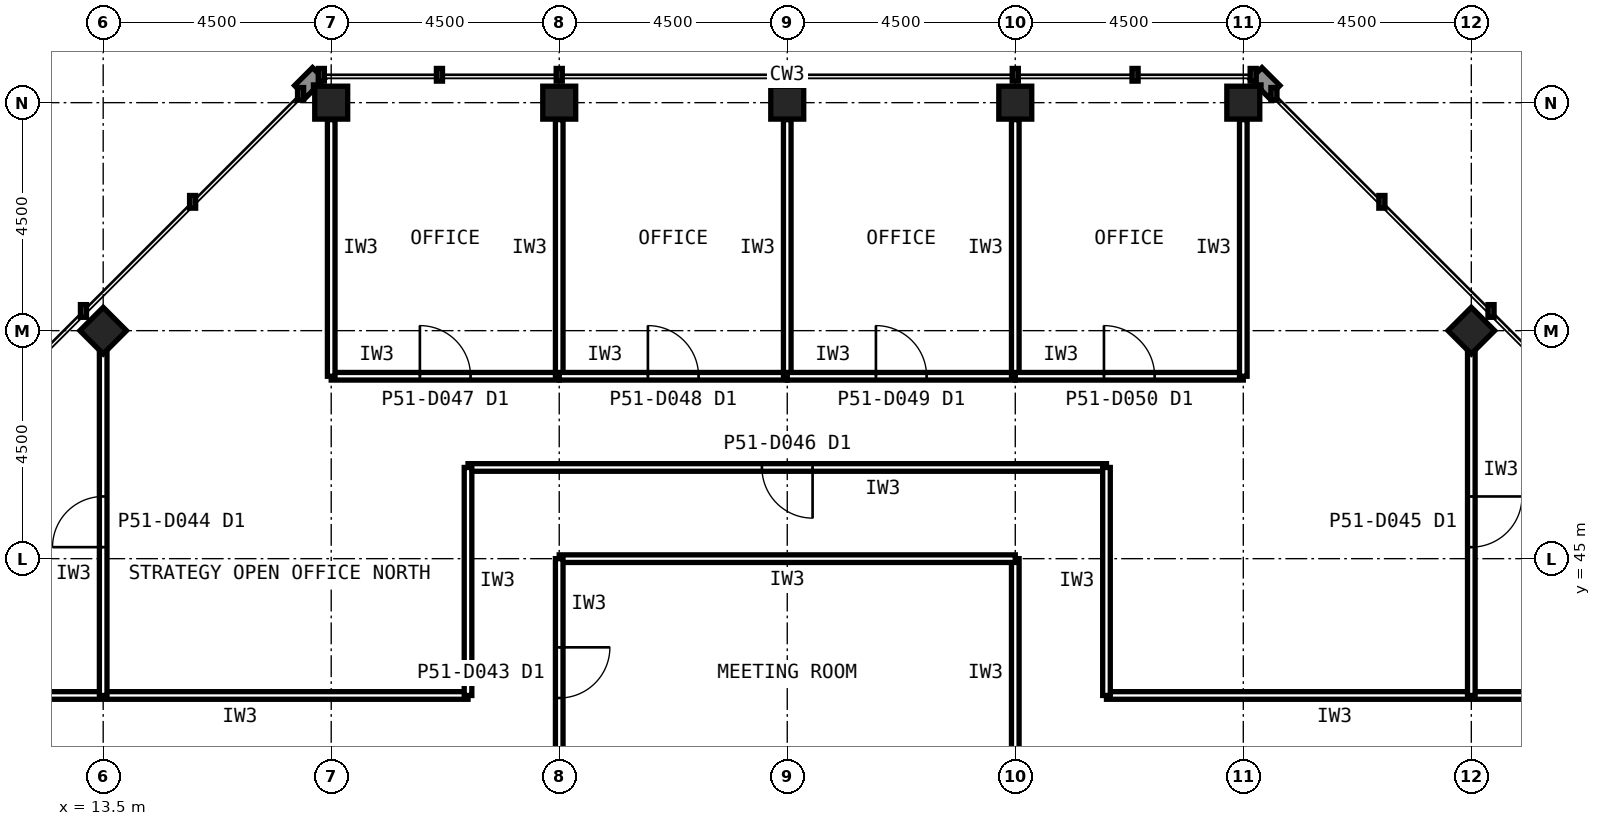
"""IFC4 building model, lengths in metres.
Left out: names, types, materials, properties, quantities, classifications, styles, units other than length and angle.
Written with IfcOpenShell. Run it as: python <this file> out.ifc"""

import sys

from ifc_helpers import new_model, si_unit, direction, frame, frame_2d, origin, origin_2d, place, context, subcontext, project, spatial, rectangle, hollow_rectangle, extrude, element, fill, save


model = new_model("IFC4")
c1 = context("Model", 3, precision=1e-05, world=origin(), true_north=direction((0.0, 1.0)))
c2 = subcontext(c1, "Body", "Model", "MODEL_VIEW")
j1 = project(units=[si_unit("LENGTHUNIT", "METRE"), si_unit("PLANEANGLEUNIT", "RADIAN")], contexts=[c1])
p1 = place(None, origin())
s1 = spatial("IfcSite", under=j1, at=p1, CompositionType="ELEMENT")
p2 = place(p1, origin())
s2 = spatial("IfcBuilding", under=s1, at=p2, CompositionType="ELEMENT")
p3 = place(p2, frame((0.0, 0.0, 214.6)))
s3 = spatial("IfcBuildingStorey", under=s2, at=p3, CompositionType="ELEMENT", Elevation=214.6)
for number, where, z_axis, x_axis in (
    (1, (36.0, 54.0, 0.0), (0.0, 0.0, 1.0), (1.0, 0.0, 0.0)),
    (2, (31.5, 54.0, 0.0), (0.0, 0.0, 1.0), (1.0, 0.0, 0.0)),
    (3, (27.0, 54.0, 0.0), (0.0, 0.0, 1.0), (1.0, 0.0, 0.0)),
    (4, (22.5, 54.0, 0.0), (0.0, 0.0, 1.0), (1.0, 0.0, 0.0)),
    (5, (18.0, 54.0, 0.0), (0.0, 0.0, 1.0), (1.0, 0.0, 0.0)),
    (6, (40.5, 49.5, 0.0), (0.0, 0.0, 1.0), (0.707, 0.707, 0.0)),
    (7, (13.5, 49.5, 0.0), (0.0, 0.0, 1.0), (0.707, 0.707, 0.0)),
):
    element("IfcColumn", number, at=place(p3, frame(where, z_axis=z_axis, x_axis=x_axis)), inside=s3, PredefinedType="COLUMN", context=c2, shape_type="SweptSolid", body=[
        extrude(hollow_rectangle(XDim=0.65, YDim=0.65, WallThickness=0.032, at=origin_2d()), origin(), (0.0, 0.0, 1.0), 4.0),
    ])
p4 = place(p3, frame((33.3, 46.8, 0.0), z_axis=(0.0, 0.0, 1.0), x_axis=(-1.0, 0.0, 0.0)))
e8 = element("IfcWall", 8, at=p4, inside=s3, PredefinedType="PARTITIONING", context=c2, shape_type="SweptSolid", body=[
    extrude(rectangle(XDim=12.6, YDim=0.15, at=frame_2d((6.3, 0.0))), origin(), (0.0, 0.0, 1.0), 3.84),
])
p5 = place(p4, frame((5.8, 0.0, 0.0)))
e9 = element("IfcOpeningElement", 9, at=p5, cuts=e8, PredefinedType="OPENING", context=c2, shape_type="SweptSolid", body=[
    extrude(rectangle(XDim=1.0, YDim=2.1, at=frame_2d((0.5, 1.05))), frame((0.0, 0.085, 0.0), z_axis=(0.0, -1.0, 0.0), x_axis=(1.0, 0.0, 0.0)), (0.0, 0.0, 1.0), 0.17),
])
for number, where, z_axis, x_axis in (
    (10, (20.7, 42.3, 0.0), (0.0, 0.0, 1.0), (-1.0, 0.0, 0.0)),
    (11, (42.3, 42.3, 0.0), (0.0, 0.0, 1.0), (-1.0, 0.0, 0.0)),
):
    element("IfcWall", number, at=place(p3, frame(where, z_axis=z_axis, x_axis=x_axis)), inside=s3, PredefinedType="PARTITIONING", context=c2, shape_type="SweptSolid", body=[
        extrude(rectangle(XDim=9.0, YDim=0.15, at=frame_2d((4.5, 0.0))), origin(), (0.0, 0.0, 1.0), 3.84),
    ])
for number, where, z_axis, x_axis in (
    (12, (20.7, 46.8, 0.0), (0.0, 0.0, 1.0), (0.0, -1.0, 0.0)),
    (13, (33.3, 42.3, 0.0), (0.0, 0.0, 1.0), (0.0, 1.0, 0.0)),
):
    element("IfcWall", number, at=place(p3, frame(where, z_axis=z_axis, x_axis=x_axis)), inside=s3, PredefinedType="PARTITIONING", context=c2, shape_type="SweptSolid", body=[
        extrude(rectangle(XDim=4.5, YDim=0.15, at=frame_2d((2.25, 0.0))), origin(), (0.0, 0.0, 1.0), 3.84),
    ])
p6 = place(p3, frame((18.0, 48.6, 0.0), z_axis=(0.0, 0.0, 1.0), x_axis=(1.0, 0.0, 0.0)))
e14 = element("IfcWall", 14, at=p6, inside=s3, PredefinedType="PARTITIONING", context=c2, shape_type="SweptSolid", body=[
    extrude(rectangle(XDim=4.5, YDim=0.15, at=frame_2d((2.25, 0.0))), origin(), (0.0, 0.0, 1.0), 3.84),
])
p7 = place(p6, frame((1.75, 0.0, 0.0)))
e15 = element("IfcOpeningElement", 15, at=p7, cuts=e14, PredefinedType="OPENING", context=c2, shape_type="SweptSolid", body=[
    extrude(rectangle(XDim=1.0, YDim=2.1, at=frame_2d((0.5, 1.05))), frame((0.0, 0.085, 0.0), z_axis=(0.0, -1.0, 0.0), x_axis=(1.0, 0.0, 0.0)), (0.0, 0.0, 1.0), 0.17),
])
for number, where, z_axis, x_axis in (
    (16, (22.5, 48.6, 0.0), (0.0, 0.0, 1.0), (0.0, 1.0, 0.0)),
    (17, (18.0, 53.665, 0.0), (0.0, 0.0, 1.0), (0.0, -1.0, 0.0)),
):
    element("IfcWall", number, at=place(p3, frame(where, z_axis=z_axis, x_axis=x_axis)), inside=s3, PredefinedType="PARTITIONING", context=c2, shape_type="SweptSolid", body=[
        extrude(rectangle(XDim=5.065, YDim=0.15, at=frame_2d((2.532, 0.0))), origin(), (0.0, 0.0, 1.0), 2.989),
    ])
p8 = place(p3, frame((22.5, 48.6, 0.0), z_axis=(0.0, 0.0, 1.0), x_axis=(1.0, 0.0, 0.0)))
e18 = element("IfcWall", 18, at=p8, inside=s3, PredefinedType="PARTITIONING", context=c2, shape_type="SweptSolid", body=[
    extrude(rectangle(XDim=4.5, YDim=0.15, at=frame_2d((2.25, 0.0))), origin(), (0.0, 0.0, 1.0), 3.84),
])
p9 = place(p8, frame((1.75, 0.0, 0.0)))
e19 = element("IfcOpeningElement", 19, at=p9, cuts=e18, PredefinedType="OPENING", context=c2, shape_type="SweptSolid", body=[
    extrude(rectangle(XDim=1.0, YDim=2.1, at=frame_2d((0.5, 1.05))), frame((0.0, 0.085, 0.0), z_axis=(0.0, -1.0, 0.0), x_axis=(1.0, 0.0, 0.0)), (0.0, 0.0, 1.0), 0.17),
])
p10 = place(p3, frame((27.0, 48.6, 0.0), z_axis=(0.0, 0.0, 1.0), x_axis=(0.0, 1.0, 0.0)))
e20 = element("IfcWall", 20, at=p10, inside=s3, PredefinedType="PARTITIONING", context=c2, shape_type="SweptSolid", body=[
    extrude(rectangle(XDim=5.065, YDim=0.15, at=frame_2d((2.532, 0.0))), origin(), (0.0, 0.0, 1.0), 2.989),
])
p11 = place(p3, frame((27.0, 48.6, 0.0), z_axis=(0.0, 0.0, 1.0), x_axis=(1.0, 0.0, 0.0)))
e21 = element("IfcWall", 21, at=p11, inside=s3, PredefinedType="PARTITIONING", context=c2, shape_type="SweptSolid", body=[
    extrude(rectangle(XDim=4.5, YDim=0.15, at=frame_2d((2.25, 0.0))), origin(), (0.0, 0.0, 1.0), 3.84),
])
p12 = place(p11, frame((1.75, 0.0, 0.0)))
e22 = element("IfcOpeningElement", 22, at=p12, cuts=e21, PredefinedType="OPENING", context=c2, shape_type="SweptSolid", body=[
    extrude(rectangle(XDim=1.0, YDim=2.1, at=frame_2d((0.5, 1.05))), frame((0.0, 0.085, 0.0), z_axis=(0.0, -1.0, 0.0), x_axis=(1.0, 0.0, 0.0)), (0.0, 0.0, 1.0), 0.17),
])
p13 = place(p3, frame((31.5, 48.6, 0.0), z_axis=(0.0, 0.0, 1.0), x_axis=(0.0, 1.0, 0.0)))
e23 = element("IfcWall", 23, at=p13, inside=s3, PredefinedType="PARTITIONING", context=c2, shape_type="SweptSolid", body=[
    extrude(rectangle(XDim=5.065, YDim=0.15, at=frame_2d((2.532, 0.0))), origin(), (0.0, 0.0, 1.0), 2.989),
])
p14 = place(p3, frame((31.5, 48.6, 0.0), z_axis=(0.0, 0.0, 1.0), x_axis=(1.0, 0.0, 0.0)))
e24 = element("IfcWall", 24, at=p14, inside=s3, PredefinedType="PARTITIONING", context=c2, shape_type="SweptSolid", body=[
    extrude(rectangle(XDim=4.5, YDim=0.15, at=frame_2d((2.25, 0.0))), origin(), (0.0, 0.0, 1.0), 3.84),
])
p15 = place(p14, frame((1.75, 0.0, 0.0)))
e25 = element("IfcOpeningElement", 25, at=p15, cuts=e24, PredefinedType="OPENING", context=c2, shape_type="SweptSolid", body=[
    extrude(rectangle(XDim=1.0, YDim=2.1, at=frame_2d((0.5, 1.05))), frame((0.0, 0.085, 0.0), z_axis=(0.0, -1.0, 0.0), x_axis=(1.0, 0.0, 0.0)), (0.0, 0.0, 1.0), 0.17),
])
p16 = place(p3, frame((36.0, 48.6, 0.0), z_axis=(0.0, 0.0, 1.0), x_axis=(0.0, 1.0, 0.0)))
e26 = element("IfcWall", 26, at=p16, inside=s3, PredefinedType="PARTITIONING", context=c2, shape_type="SweptSolid", body=[
    extrude(rectangle(XDim=5.065, YDim=0.15, at=frame_2d((2.532, 0.0))), origin(), (0.0, 0.0, 1.0), 2.989),
])
p17 = place(p3, frame((31.5, 40.5, 0.0), z_axis=(0.0, 0.0, 1.0), x_axis=(0.0, 1.0, 0.0)))
e27 = element("IfcWall", 27, at=p17, inside=s3, PredefinedType="PARTITIONING", context=c2, shape_type="SweptSolid", body=[
    extrude(rectangle(XDim=4.5, YDim=0.15, at=frame_2d((2.25, 0.0))), origin(), (0.0, 0.0, 1.0), 2.989),
])
p18 = place(p3, frame((31.5, 45.0, 0.0), z_axis=(0.0, 0.0, 1.0), x_axis=(-1.0, 0.0, 0.0)))
e28 = element("IfcWall", 28, at=p18, inside=s3, PredefinedType="PARTITIONING", context=c2, shape_type="SweptSolid", body=[
    extrude(rectangle(XDim=9.0, YDim=0.15, at=frame_2d((4.5, 0.0))), origin(), (0.0, 0.0, 1.0), 3.84),
])
p19 = place(p3, frame((22.5, 45.0, 0.0), z_axis=(0.0, 0.0, 1.0), x_axis=(0.0, -1.0, 0.0)))
e29 = element("IfcWall", 29, at=p19, inside=s3, PredefinedType="PARTITIONING", context=c2, shape_type="SweptSolid", body=[
    extrude(rectangle(XDim=4.5, YDim=0.15, at=frame_2d((2.25, 0.0))), origin(), (0.0, 0.0, 1.0), 2.989),
])
p20 = place(p19, frame((1.75, 0.0, 0.0)))
e30 = element("IfcOpeningElement", 30, at=p20, cuts=e29, PredefinedType="OPENING", context=c2, shape_type="SweptSolid", body=[
    extrude(rectangle(XDim=1.0, YDim=2.1, at=frame_2d((0.5, 1.05))), frame((0.0, 0.085, 0.0), z_axis=(0.0, -1.0, 0.0), x_axis=(1.0, 0.0, 0.0)), (0.0, 0.0, 1.0), 0.17),
])
p21 = place(p3, frame((40.5, 49.155, 0.0), z_axis=(0.0, 0.0, 1.0), x_axis=(0.0, -1.0, 0.0)))
e31 = element("IfcWall", 31, at=p21, inside=s3, PredefinedType="PARTITIONING", context=c2, shape_type="SweptSolid", body=[
    extrude(rectangle(XDim=6.855, YDim=0.15, at=frame_2d((3.427, 0.0))), origin(), (0.0, 0.0, 1.0), 2.989),
])
p22 = place(p21, frame((2.927, 0.0, 0.0)))
e32 = element("IfcOpeningElement", 32, at=p22, cuts=e31, PredefinedType="OPENING", context=c2, shape_type="SweptSolid", body=[
    extrude(rectangle(XDim=1.0, YDim=2.1, at=frame_2d((0.5, 1.05))), frame((0.0, 0.085, 0.0), z_axis=(0.0, -1.0, 0.0), x_axis=(1.0, 0.0, 0.0)), (0.0, 0.0, 1.0), 0.17),
])
p23 = place(p3, frame((13.5, 42.3, 0.0), z_axis=(0.0, 0.0, 1.0), x_axis=(0.0, 1.0, 0.0)))
e33 = element("IfcWall", 33, at=p23, inside=s3, PredefinedType="PARTITIONING", context=c2, shape_type="SweptSolid", body=[
    extrude(rectangle(XDim=6.855, YDim=0.15, at=frame_2d((3.427, 0.0))), origin(), (0.0, 0.0, 1.0), 2.989),
])
p24 = place(p23, frame((2.927, 0.0, 0.0)))
e34 = element("IfcOpeningElement", 34, at=p24, cuts=e33, PredefinedType="OPENING", context=c2, shape_type="SweptSolid", body=[
    extrude(rectangle(XDim=1.0, YDim=2.1, at=frame_2d((0.5, 1.05))), frame((0.0, 0.085, 0.0), z_axis=(0.0, -1.0, 0.0), x_axis=(1.0, 0.0, 0.0)), (0.0, 0.0, 1.0), 0.17),
])
p25 = place(p5, origin())
e35 = element("IfcDoor", 35, at=p25, inside=s3, OperationType="SINGLE_SWING_LEFT", PredefinedType="DOOR", context=c2, shape_type="SweptSolid", body=[
    extrude(rectangle(XDim=1.0, YDim=2.1, at=frame_2d((0.5, 1.05))), frame((0.0, 0.025, 0.0), z_axis=(0.0, -1.0, 0.0), x_axis=(1.0, 0.0, 0.0)), (0.0, 0.0, 1.0), 0.05),
])
fill(e9, e35)
p26 = place(p7, origin())
e36 = element("IfcDoor", 36, at=p26, inside=s3, OperationType="SINGLE_SWING_LEFT", PredefinedType="DOOR", context=c2, shape_type="SweptSolid", body=[
    extrude(rectangle(XDim=1.0, YDim=2.1, at=frame_2d((0.5, 1.05))), frame((0.0, 0.025, 0.0), z_axis=(0.0, -1.0, 0.0), x_axis=(1.0, 0.0, 0.0)), (0.0, 0.0, 1.0), 0.05),
])
fill(e15, e36)
p27 = place(p9, origin())
e37 = element("IfcDoor", 37, at=p27, inside=s3, OperationType="SINGLE_SWING_LEFT", PredefinedType="DOOR", context=c2, shape_type="SweptSolid", body=[
    extrude(rectangle(XDim=1.0, YDim=2.1, at=frame_2d((0.5, 1.05))), frame((0.0, 0.025, 0.0), z_axis=(0.0, -1.0, 0.0), x_axis=(1.0, 0.0, 0.0)), (0.0, 0.0, 1.0), 0.05),
])
fill(e19, e37)
p28 = place(p12, origin())
e38 = element("IfcDoor", 38, at=p28, inside=s3, OperationType="SINGLE_SWING_LEFT", PredefinedType="DOOR", context=c2, shape_type="SweptSolid", body=[
    extrude(rectangle(XDim=1.0, YDim=2.1, at=frame_2d((0.5, 1.05))), frame((0.0, 0.025, 0.0), z_axis=(0.0, -1.0, 0.0), x_axis=(1.0, 0.0, 0.0)), (0.0, 0.0, 1.0), 0.05),
])
fill(e22, e38)
p29 = place(p15, origin())
e39 = element("IfcDoor", 39, at=p29, inside=s3, OperationType="SINGLE_SWING_LEFT", PredefinedType="DOOR", context=c2, shape_type="SweptSolid", body=[
    extrude(rectangle(XDim=1.0, YDim=2.1, at=frame_2d((0.5, 1.05))), frame((0.0, 0.025, 0.0), z_axis=(0.0, -1.0, 0.0), x_axis=(1.0, 0.0, 0.0)), (0.0, 0.0, 1.0), 0.05),
])
fill(e25, e39)
p30 = place(p20, origin())
e40 = element("IfcDoor", 40, at=p30, inside=s3, OperationType="SINGLE_SWING_LEFT", PredefinedType="DOOR", context=c2, shape_type="SweptSolid", body=[
    extrude(rectangle(XDim=1.0, YDim=2.1, at=frame_2d((0.5, 1.05))), frame((0.0, 0.025, 0.0), z_axis=(0.0, -1.0, 0.0), x_axis=(1.0, 0.0, 0.0)), (0.0, 0.0, 1.0), 0.05),
])
fill(e30, e40)
p31 = place(p22, origin())
e41 = element("IfcDoor", 41, at=p31, inside=s3, OperationType="SINGLE_SWING_LEFT", PredefinedType="DOOR", context=c2, shape_type="SweptSolid", body=[
    extrude(rectangle(XDim=1.0, YDim=2.1, at=frame_2d((0.5, 1.05))), frame((0.0, 0.025, 0.0), z_axis=(0.0, -1.0, 0.0), x_axis=(1.0, 0.0, 0.0)), (0.0, 0.0, 1.0), 0.05),
])
fill(e32, e41)
p32 = place(p24, origin())
e42 = element("IfcDoor", 42, at=p32, inside=s3, OperationType="SINGLE_SWING_LEFT", PredefinedType="DOOR", context=c2, shape_type="SweptSolid", body=[
    extrude(rectangle(XDim=1.0, YDim=2.1, at=frame_2d((0.5, 1.05))), frame((0.0, 0.025, 0.0), z_axis=(0.0, -1.0, 0.0), x_axis=(1.0, 0.0, 0.0)), (0.0, 0.0, 1.0), 0.05),
])
fill(e34, e42)
save(model, sys.argv[1])
